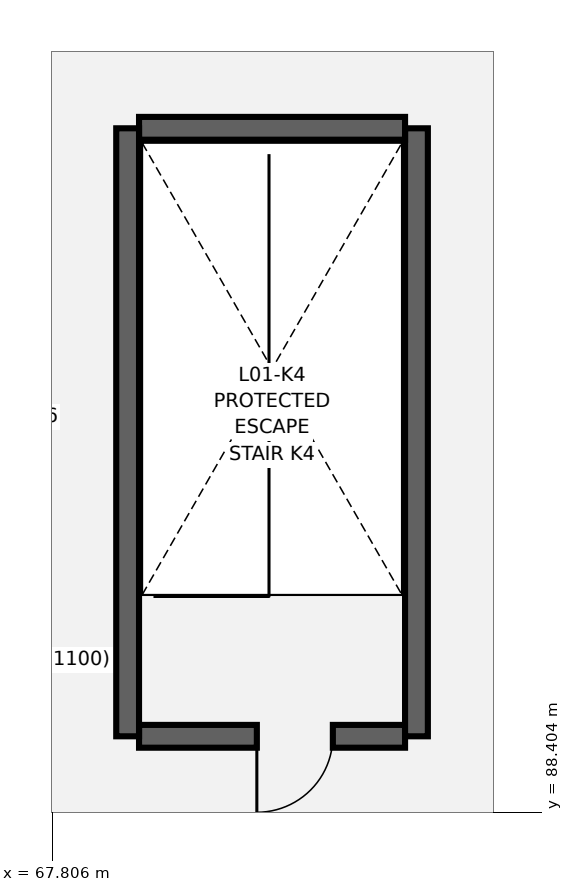
"""IFC4 building model, lengths in metres.
Left out: names, types, materials, properties, quantities, classifications, styles, units other than length and angle.
Written with IfcOpenShell. Run it as: python <this file> out.ifc"""

import sys

from ifc_helpers import new_model, si_unit, direction, frame, frame_2d, origin, place, context, subcontext, project, spatial, rectangle, extrude, element, fill, save


model = new_model("IFC4")
c1 = context("Model", 3, precision=1e-05, world=origin(), true_north=direction((0.0, 1.0)))
c2 = subcontext(c1, "Body", "Model", "MODEL_VIEW")
j1 = project(units=[si_unit("LENGTHUNIT", "METRE"), si_unit("PLANEANGLEUNIT", "RADIAN")], contexts=[c1])
p1 = place(None, origin())
s1 = spatial("IfcSite", under=j1, at=p1, CompositionType="ELEMENT")
p2 = place(p1, origin())
s2 = spatial("IfcBuilding", under=s1, at=p2, CompositionType="ELEMENT")
p3 = place(p2, frame((0.0, 0.0, 5.4)))
s3 = spatial("IfcBuildingStorey", under=s2, at=p3, CompositionType="ELEMENT", Elevation=5.4)
p4 = place(p3, frame((72.45, 89.4, 0.0), z_axis=(0.0, 0.0, 1.0), x_axis=(-1.0, 0.0, 0.0)))
e1 = element("IfcWall", 1, at=p4, inside=s3, PredefinedType="SHEAR", context=c2, shape_type="SweptSolid", body=[
    extrude(rectangle(XDim=3.5, YDim=0.3, at=frame_2d((1.75, 0.0))), origin(), (0.0, 0.0, 1.0), 4.5),
])
p5 = place(p4, frame((0.95, 0.0, 0.0)))
e2 = element("IfcOpeningElement", 2, at=p5, cuts=e1, PredefinedType="OPENING", context=c2, shape_type="SweptSolid", body=[
    extrude(rectangle(XDim=1.0, YDim=2.15, at=frame_2d((0.5, 1.075))), frame((0.0, 0.16, 0.0), z_axis=(0.0, -1.0, 0.0), x_axis=(1.0, 0.0, 0.0)), (0.0, 0.0, 1.0), 0.32),
])
p6 = place(p3, frame((72.6, 89.4, 0.0), z_axis=(0.0, 0.0, 1.0), x_axis=(0.0, 1.0, 0.0)))
e3 = element("IfcWall", 3, at=p6, inside=s3, PredefinedType="SHEAR", context=c2, shape_type="SweptSolid", body=[
    extrude(rectangle(XDim=8.0, YDim=0.3, at=frame_2d((4.0, 0.0))), origin(), (0.0, 0.0, 1.0), 4.5),
])
p7 = place(p3, frame((72.45, 97.4, 0.0), z_axis=(0.0, 0.0, 1.0), x_axis=(-1.0, 0.0, 0.0)))
e4 = element("IfcWall", 4, at=p7, inside=s3, PredefinedType="SHEAR", context=c2, shape_type="SweptSolid", body=[
    extrude(rectangle(XDim=3.5, YDim=0.3, at=frame_2d((1.75, 0.0))), origin(), (0.0, 0.0, 1.0), 4.5),
])
p8 = place(p3, frame((68.8, 97.4, 0.0), z_axis=(0.0, 0.0, 1.0), x_axis=(0.0, -1.0, 0.0)))
e5 = element("IfcWall", 5, at=p8, inside=s3, PredefinedType="SHEAR", context=c2, shape_type="SweptSolid", body=[
    extrude(rectangle(XDim=8.0, YDim=0.3, at=frame_2d((4.0, 0.0))), origin(), (0.0, 0.0, 1.0), 4.5),
])
p9 = place(p5, origin())
e6 = element("IfcDoor", 6, at=p9, inside=s3, OperationType="SINGLE_SWING_RIGHT", PredefinedType="DOOR", context=c2, shape_type="SweptSolid", body=[
    extrude(rectangle(XDim=1.0, YDim=2.15, at=frame_2d((0.5, 1.075))), frame((0.0, 0.025, 0.0), z_axis=(0.0, -1.0, 0.0), x_axis=(1.0, 0.0, 0.0)), (0.0, 0.0, 1.0), 0.05),
])
fill(e2, e6)
save(model, sys.argv[1])
